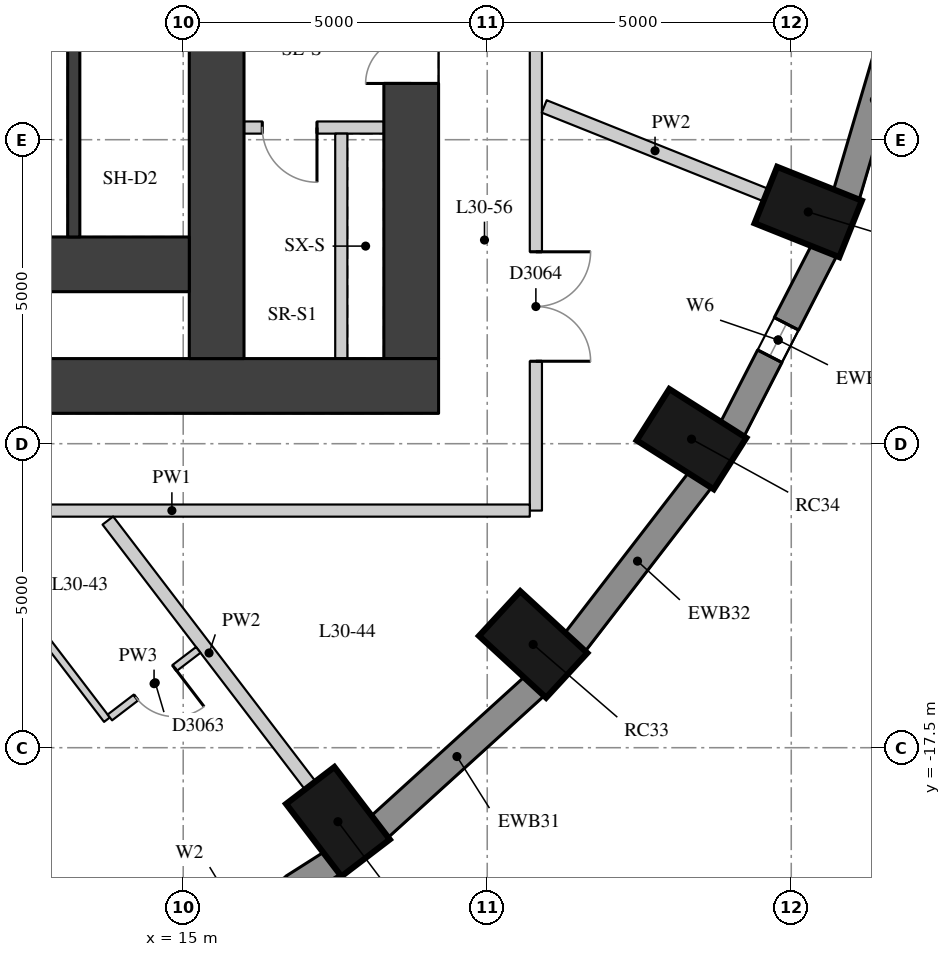
"""IFC4 building model, lengths in metres.
Left out: names, types, materials, properties, quantities, classifications, styles, units other than length and angle.
Written with IfcOpenShell. Run it as: python <this file> out.ifc"""

import sys

from ifc_helpers import new_model, si_unit, direction, frame, frame_2d, origin, origin_2d, place, context, subcontext, project, spatial, rectangle, extrude, element, fill, save


model = new_model("IFC4")
c1 = context("Model", 3, precision=1e-05, world=origin(), true_north=direction((0.0, 1.0)))
c2 = subcontext(c1, "Body", "Model", "MODEL_VIEW")
j1 = project(units=[si_unit("LENGTHUNIT", "METRE"), si_unit("PLANEANGLEUNIT", "RADIAN")], contexts=[c1])
p1 = place(None, origin())
s1 = spatial("IfcSite", under=j1, at=p1, CompositionType="ELEMENT")
p2 = place(p1, origin())
s2 = spatial("IfcBuilding", under=s1, at=p2, CompositionType="ELEMENT")
p3 = place(p2, frame((0.0, 0.0, 108.7)))
s3 = spatial("IfcBuildingStorey", under=s2, at=p3, CompositionType="ELEMENT", Elevation=108.7)
for number, where, z_axis, x_axis in (
    (1, (17.545, -18.717, 0.0), (0.0, 0.0, 1.0), (0.607, -0.795, 0.0)),
    (2, (20.755, -15.802, 0.0), (0.0, 0.0, 1.0), (0.735, -0.678, 0.0)),
    (3, (23.36, -12.425, 0.0), (0.0, 0.0, 1.0), (0.845, -0.536, 0.0)),
    (4, (25.279, -8.689, 0.0), (0.0, 0.0, 1.0), (0.929, -0.371, 0.0)),
):
    element("IfcColumn", number, at=place(p3, frame(where, z_axis=z_axis, x_axis=x_axis)), inside=s3, PredefinedType="COLUMN", context=c2, shape_type="SweptSolid", body=[
        extrude(rectangle(XDim=1.5, YDim=1.0, at=origin_2d()), origin(), (0.0, 0.0, 1.0), 3.3),
    ])
p4 = place(p3, frame((14.475, -21.287, 0.0), z_axis=(0.0, 0.0, 1.0), x_axis=(0.843911841423, 0.536481876587, 0.0)))
e5 = element("IfcWall", 5, at=p4, inside=s3, PredefinedType="SOLIDWALL", context=c2, shape_type="SweptSolid", body=[
    extrude(rectangle(XDim=3.532, YDim=0.45, at=frame_2d((1.766, 0.0))), origin(), (0.0, 0.0, 1.0), 3.02),
])
p5 = place(p4, frame((0.766, 0.0, 0.4)))
e6 = element("IfcOpeningElement", 6, at=p5, cuts=e5, PredefinedType="OPENING", context=c2, shape_type="SweptSolid", body=[
    extrude(rectangle(XDim=2.0, YDim=1.75, at=frame_2d((1.0, 0.875))), frame((0.0, 0.235, 0.0), z_axis=(0.0, -1.0, 0.0), x_axis=(1.0, 0.0, 0.0)), (0.0, 0.0, 1.0), 0.47),
])
p6 = place(p3, frame((18.219, -18.81, 0.0), z_axis=(0.0, 0.0, 1.0), x_axis=(0.740364106106, 0.672206062446, 0.0)))
e7 = element("IfcWall", 7, at=p6, inside=s3, PredefinedType="SOLIDWALL", context=c2, shape_type="SweptSolid", body=[
    extrude(rectangle(XDim=3.464, YDim=0.45, at=frame_2d((1.732, 0.0))), origin(), (0.0, 0.0, 1.0), 3.02),
])
p7 = place(p3, frame((21.435, -15.775, 0.0), z_axis=(0.0, 0.0, 1.0), x_axis=(0.610693945156, 0.791866721961, 0.0)))
e8 = element("IfcWall", 8, at=p7, inside=s3, PredefinedType="SOLIDWALL", context=c2, shape_type="SweptSolid", body=[
    extrude(rectangle(XDim=3.395, YDim=0.45, at=frame_2d((1.697, 0.0))), origin(), (0.0, 0.0, 1.0), 3.02),
])
p8 = place(p3, frame((24.023, -12.277, 0.0), z_axis=(0.0, 0.0, 1.0), x_axis=(0.456828186229, 0.889554949549, 0.0)))
e9 = element("IfcWall", 9, at=p8, inside=s3, PredefinedType="SOLIDWALL", context=c2, shape_type="SweptSolid", body=[
    extrude(rectangle(XDim=3.333, YDim=0.45, at=frame_2d((1.667, 0.0))), origin(), (0.0, 0.0, 1.0), 3.02),
])
p9 = place(p8, frame((1.366, 0.0, 0.4)))
e10 = element("IfcOpeningElement", 10, at=p9, cuts=e9, PredefinedType="OPENING", context=c2, shape_type="SweptSolid", body=[
    extrude(rectangle(XDim=0.6, YDim=1.75, at=frame_2d((0.3, 0.875))), frame((0.0, 0.235, 0.0), z_axis=(0.0, -1.0, 0.0), x_axis=(1.0, 0.0, 0.0)), (0.0, 0.0, 1.0), 0.47),
])
p10 = place(p3, frame((25.902, -8.421, 0.0), z_axis=(0.0, 0.0, 1.0), x_axis=(0.282982737009, 0.95912500257, 0.0)))
e11 = element("IfcWall", 11, at=p10, inside=s3, PredefinedType="SOLIDWALL", context=c2, shape_type="SweptSolid", body=[
    extrude(rectangle(XDim=3.286, YDim=0.45, at=frame_2d((1.643, 0.0))), origin(), (0.0, 0.0, 1.0), 3.02),
])
p11 = place(p3, frame((18.75, -11.1, 0.0), z_axis=(0.0, 0.0, 1.0), x_axis=(0.0, 1.0, 0.0)))
e12 = element("IfcWall", 12, at=p11, inside=s3, PredefinedType="SHEAR", context=c2, shape_type="SweptSolid", body=[
    extrude(rectangle(XDim=22.2, YDim=0.9, at=frame_2d((11.1, 0.0))), origin(), (0.0, 0.0, 1.0), 3.02),
])
p12 = place(p11, frame((15.925, 0.0, 0.0)))
e13 = element("IfcOpeningElement", 13, at=p12, cuts=e12, PredefinedType="OPENING", context=c2, shape_type="SweptSolid", body=[
    extrude(rectangle(XDim=1.5, YDim=2.1, at=frame_2d((0.75, 1.05))), frame((0.0, 0.46, 0.0), z_axis=(0.0, -1.0, 0.0), x_axis=(1.0, 0.0, 0.0)), (0.0, 0.0, 1.0), 0.92),
])
p13 = place(p11, frame((4.525, 0.0, 0.0)))
e14 = element("IfcOpeningElement", 14, at=p13, cuts=e12, PredefinedType="OPENING", context=c2, shape_type="SweptSolid", body=[
    extrude(rectangle(XDim=1.5, YDim=2.1, at=frame_2d((0.75, 1.05))), frame((0.0, 0.46, 0.0), z_axis=(0.0, -1.0, 0.0), x_axis=(1.0, 0.0, 0.0)), (0.0, 0.0, 1.0), 0.92),
])
p14 = place(p3, frame((4.0, -11.55, 0.0), z_axis=(0.0, 0.0, 1.0), x_axis=(1.0, 0.0, 0.0)))
e15 = element("IfcWall", 15, at=p14, inside=s3, PredefinedType="SHEAR", context=c2, shape_type="SweptSolid", body=[
    extrude(rectangle(XDim=15.2, YDim=0.9, at=frame_2d((7.6, 0.0))), origin(), (0.0, 0.0, 1.0), 3.02),
])
p15 = place(p3, frame((15.55, -11.1, 0.0), z_axis=(0.0, 0.0, 1.0), x_axis=(0.0, 1.0, 0.0)))
e16 = element("IfcWall", 16, at=p15, inside=s3, PredefinedType="SHEAR", context=c2, shape_type="SweptSolid", body=[
    extrude(rectangle(XDim=22.2, YDim=0.9, at=frame_2d((11.1, 0.0))), origin(), (0.0, 0.0, 1.0), 3.02),
])
p16 = place(p15, frame((15.6, 0.0, 0.0)))
e17 = element("IfcOpeningElement", 17, at=p16, cuts=e16, PredefinedType="OPENING", context=c2, shape_type="SweptSolid", body=[
    extrude(rectangle(XDim=1.0, YDim=2.1, at=frame_2d((0.5, 1.05))), frame((0.0, 0.46, 0.0), z_axis=(0.0, -1.0, 0.0), x_axis=(1.0, 0.0, 0.0)), (0.0, 0.0, 1.0), 0.92),
])
p17 = place(p15, frame((5.6, 0.0, 0.0)))
e18 = element("IfcOpeningElement", 18, at=p17, cuts=e16, PredefinedType="OPENING", context=c2, shape_type="SweptSolid", body=[
    extrude(rectangle(XDim=1.0, YDim=2.1, at=frame_2d((0.5, 1.05))), frame((0.0, 0.46, 0.0), z_axis=(0.0, -1.0, 0.0), x_axis=(1.0, 0.0, 0.0)), (0.0, 0.0, 1.0), 0.92),
])
p18 = place(p3, frame((4.9, -9.55, 0.0), z_axis=(0.0, 0.0, 1.0), x_axis=(1.0, 0.0, 0.0)))
e19 = element("IfcWall", 19, at=p18, inside=s3, PredefinedType="SHEAR", context=c2, shape_type="SweptSolid", body=[
    extrude(rectangle(XDim=10.2, YDim=0.9, at=frame_2d((5.1, 0.0))), origin(), (0.0, 0.0, 1.0), 3.02),
])
p19 = place(p3, frame((13.2, -9.1, 0.0), z_axis=(0.0, 0.0, 1.0), x_axis=(0.0, 1.0, 0.0)))
e20 = element("IfcWall", 20, at=p19, inside=s3, PredefinedType="SHEAR", context=c2, shape_type="SweptSolid", body=[
    extrude(rectangle(XDim=3.2, YDim=0.2, at=frame_2d((1.6, 0.0))), origin(), (0.0, 0.0, 1.0), 3.02),
])
p20 = place(p3, frame((16.0, -7.3, 0.0), z_axis=(0.0, 0.0, 1.0), x_axis=(1.0, 0.0, 0.0)))
e21 = element("IfcWall", 21, at=p20, inside=s3, PredefinedType="PARTITIONING", context=c2, shape_type="SweptSolid", body=[
    extrude(rectangle(XDim=2.3, YDim=0.2, at=frame_2d((1.15, 0.0))), origin(), (0.0, 0.0, 1.0), 3.02),
])
p21 = place(p20, frame((0.3, 0.0, 0.0)))
e22 = element("IfcOpeningElement", 22, at=p21, cuts=e21, PredefinedType="OPENING", context=c2, shape_type="SweptSolid", body=[
    extrude(rectangle(XDim=0.9, YDim=2.1, at=frame_2d((0.45, 1.05))), frame((0.0, 0.11, 0.0), z_axis=(0.0, -1.0, 0.0), x_axis=(1.0, 0.0, 0.0)), (0.0, 0.0, 1.0), 0.22),
])
p22 = place(p3, frame((17.6, -11.1, 0.0), z_axis=(0.0, 0.0, 1.0), x_axis=(0.0, 1.0, 0.0)))
e23 = element("IfcWall", 23, at=p22, inside=s3, PredefinedType="PARTITIONING", context=c2, shape_type="SweptSolid", body=[
    extrude(rectangle(XDim=3.7, YDim=0.2, at=frame_2d((1.85, 0.0))), origin(), (0.0, 0.0, 1.0), 3.02),
])
p23 = place(p3, frame((20.8, 13.5, 0.0), z_axis=(0.0, 0.0, 1.0), x_axis=(0.0, -1.0, 0.0)))
e24 = element("IfcWall", 24, at=p23, inside=s3, PredefinedType="PARTITIONING", context=c2, shape_type="SweptSolid", body=[
    extrude(rectangle(XDim=27.1, YDim=0.2, at=frame_2d((13.55, 0.0))), origin(), (0.0, 0.0, 1.0), 3.02),
])
p24 = place(p23, frame((22.844, 0.0, 0.0)))
e25 = element("IfcOpeningElement", 25, at=p24, cuts=e24, PredefinedType="OPENING", context=c2, shape_type="SweptSolid", body=[
    extrude(rectangle(XDim=1.8, YDim=2.1, at=frame_2d((0.9, 1.05))), frame((0.0, 0.11, 0.0), z_axis=(0.0, -1.0, 0.0), x_axis=(1.0, 0.0, 0.0)), (0.0, 0.0, 1.0), 0.22),
])
p25 = place(p23, frame((16.35, 0.0, 0.0)))
e26 = element("IfcOpeningElement", 26, at=p25, cuts=e24, PredefinedType="OPENING", context=c2, shape_type="SweptSolid", body=[
    extrude(rectangle(XDim=1.8, YDim=2.1, at=frame_2d((0.9, 1.05))), frame((0.0, 0.11, 0.0), z_axis=(0.0, -1.0, 0.0), x_axis=(1.0, 0.0, 0.0)), (0.0, 0.0, 1.0), 0.22),
])
p26 = place(p23, frame((10.051, 0.0, 0.0)))
e27 = element("IfcOpeningElement", 27, at=p26, cuts=e24, PredefinedType="OPENING", context=c2, shape_type="SweptSolid", body=[
    extrude(rectangle(XDim=1.8, YDim=2.1, at=frame_2d((0.9, 1.05))), frame((0.0, 0.11, 0.0), z_axis=(0.0, -1.0, 0.0), x_axis=(1.0, 0.0, 0.0)), (0.0, 0.0, 1.0), 0.22),
])
p27 = place(p3, frame((20.7, -13.6, 0.0), z_axis=(0.0, 0.0, 1.0), x_axis=(-1.0, 0.0, 0.0)))
e28 = element("IfcWall", 28, at=p27, inside=s3, PredefinedType="PARTITIONING", context=c2, shape_type="SweptSolid", body=[
    extrude(rectangle(XDim=11.772, YDim=0.2, at=frame_2d((5.886, 0.0))), origin(), (0.0, 0.0, 1.0), 3.02),
])
p28 = place(p3, frame((17.089, -18.121, 0.0), z_axis=(0.0, 0.0, 1.0), x_axis=(-0.607064955951, 0.794652212767, 0.0)))
e29 = element("IfcWall", 29, at=p28, inside=s3, PredefinedType="PARTITIONING", context=c2, shape_type="SweptSolid", body=[
    extrude(rectangle(XDim=5.483, YDim=0.22, at=frame_2d((2.742, 0.0))), origin(), (0.0, 0.0, 1.0), 3.02),
])
p29 = place(p3, frame((24.583, -8.41, 0.0), z_axis=(0.0, 0.0, 1.0), x_axis=(-0.928528147853, 0.371262008083, 0.0)))
e30 = element("IfcWall", 30, at=p29, inside=s3, PredefinedType="PARTITIONING", context=c2, shape_type="SweptSolid", body=[
    extrude(rectangle(XDim=3.926, YDim=0.22, at=frame_2d((1.963, 0.0))), origin(), (0.0, 0.0, 1.0), 3.02),
])
p30 = place(p3, frame((11.219, -13.732, 0.0), z_axis=(0.0, 0.0, 1.0), x_axis=(0.607090774052, -0.794632488677, 0.0)))
e31 = element("IfcWall", 31, at=p30, inside=s3, PredefinedType="PARTITIONING", context=c2, shape_type="SweptSolid", body=[
    extrude(rectangle(XDim=4.162, YDim=0.12, at=frame_2d((2.081, 0.0))), origin(), (0.0, 0.0, 1.0), 3.02),
])
p31 = place(p3, frame((13.794, -17.002, 0.0), z_axis=(0.0, 0.0, 1.0), x_axis=(0.794653128783, 0.607063756878, 0.0)))
e32 = element("IfcWall", 32, at=p31, inside=s3, PredefinedType="PARTITIONING", context=c2, shape_type="SweptSolid", body=[
    extrude(rectangle(XDim=1.83, YDim=0.12, at=frame_2d((0.915, 0.0))), origin(), (0.0, 0.0, 1.0), 3.02),
])
p32 = place(p31, frame((0.54, 0.0, 0.0)))
e33 = element("IfcOpeningElement", 33, at=p32, cuts=e32, PredefinedType="OPENING", context=c2, shape_type="SweptSolid", body=[
    extrude(rectangle(XDim=0.8, YDim=2.1, at=frame_2d((0.4, 1.05))), frame((0.0, 0.07, 0.0), z_axis=(0.0, -1.0, 0.0), x_axis=(1.0, 0.0, 0.0)), (0.0, 0.0, 1.0), 0.14),
])
p33 = place(p9, origin())
e34 = element("IfcWindow", 34, at=p33, inside=s3, PartitioningType="SINGLE_PANEL", PredefinedType="WINDOW", context=c2, shape_type="SweptSolid", body=[
    extrude(rectangle(XDim=0.6, YDim=1.75, at=frame_2d((0.3, 0.875))), frame((0.0, 0.035, 0.0), z_axis=(0.0, -1.0, 0.0), x_axis=(1.0, 0.0, 0.0)), (0.0, 0.0, 1.0), 0.06),
])
fill(e10, e34)
p34 = place(p13, origin())
e35 = element("IfcDoor", 35, at=p34, inside=s3, OperationType="DOUBLE_DOOR_SINGLE_SWING", PredefinedType="DOOR", context=c2, shape_type="SweptSolid", body=[
    extrude(rectangle(XDim=1.5, YDim=2.1, at=frame_2d((0.75, 1.05))), frame((0.0, 0.025, 0.0), z_axis=(0.0, -1.0, 0.0), x_axis=(1.0, 0.0, 0.0)), (0.0, 0.0, 1.0), 0.05),
])
fill(e14, e35)
p35 = place(p21, origin())
e36 = element("IfcDoor", 36, at=p35, inside=s3, OperationType="SINGLE_SWING_LEFT", PredefinedType="DOOR", context=c2, shape_type="SweptSolid", body=[
    extrude(rectangle(XDim=0.9, YDim=2.1, at=frame_2d((0.45, 1.05))), frame((0.0, 0.025, 0.0), z_axis=(0.0, -1.0, 0.0), x_axis=(1.0, 0.0, 0.0)), (0.0, 0.0, 1.0), 0.05),
])
fill(e22, e36)
p36 = place(p32, origin())
e37 = element("IfcDoor", 37, at=p36, inside=s3, OperationType="SINGLE_SWING_LEFT", PredefinedType="DOOR", context=c2, shape_type="SweptSolid", body=[
    extrude(rectangle(XDim=0.8, YDim=2.1, at=frame_2d((0.4, 1.05))), frame((0.0, 0.025, 0.0), z_axis=(0.0, -1.0, 0.0), x_axis=(1.0, 0.0, 0.0)), (0.0, 0.0, 1.0), 0.05),
])
fill(e33, e37)
p37 = place(p24, origin())
e38 = element("IfcDoor", 38, at=p37, inside=s3, OperationType="DOUBLE_DOOR_SINGLE_SWING", PredefinedType="DOOR", context=c2, shape_type="SweptSolid", body=[
    extrude(rectangle(XDim=1.8, YDim=2.1, at=frame_2d((0.9, 1.05))), frame((0.0, 0.025, 0.0), z_axis=(0.0, -1.0, 0.0), x_axis=(1.0, 0.0, 0.0)), (0.0, 0.0, 1.0), 0.05),
])
fill(e25, e38)
save(model, sys.argv[1])
